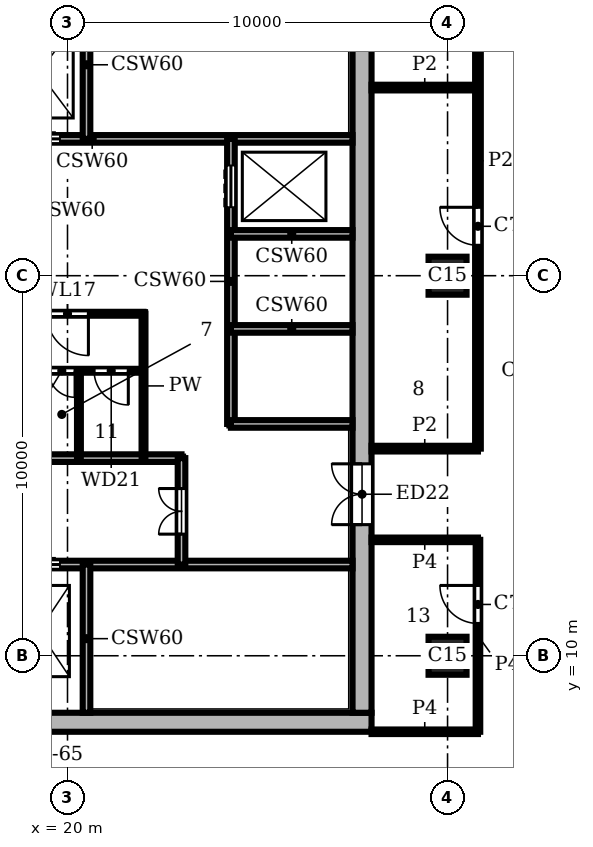
"""IFC4 building model, lengths in metres.
Left out: names, types, materials, properties, quantities, classifications, styles, units other than length and angle.
Written with IfcOpenShell. Run it as: python <this file> out.ifc"""

import sys

from ifc_helpers import new_model, si_unit, direction, frame, frame_2d, origin, origin_2d, place, context, subcontext, project, spatial, rectangle, extrude, element, fill, save


model = new_model("IFC4")
c1 = context("Model", 3, precision=1e-05, world=origin(), true_north=direction((0.0, 1.0)))
c2 = subcontext(c1, "Body", "Model", "MODEL_VIEW")
j1 = project(units=[si_unit("LENGTHUNIT", "METRE"), si_unit("PLANEANGLEUNIT", "RADIAN")], contexts=[c1])
p1 = place(None, origin())
s1 = spatial("IfcSite", under=j1, at=p1, CompositionType="ELEMENT")
p2 = place(p1, origin())
s2 = spatial("IfcBuilding", under=s1, at=p2, CompositionType="ELEMENT")
p3 = place(p2, frame((0.0, 0.0, 306.0)))
s3 = spatial("IfcBuildingStorey", under=s2, at=p3, CompositionType="ELEMENT", Elevation=306.0)
for number, where, z_axis, x_axis in (
    (1, (30.0, 10.0, 0.0), (0.0, 0.0, 1.0), (1.0, 0.0, 0.0)),
    (2, (30.0, 20.0, 0.0), (0.0, 0.0, 1.0), (1.0, 0.0, 0.0)),
):
    element("IfcColumn", number, at=place(p3, frame(where, z_axis=z_axis, x_axis=x_axis)), inside=s3, PredefinedType="COLUMN", context=c2, shape_type="SweptSolid", body=[
        extrude(rectangle(XDim=1.0, YDim=1.0, at=origin_2d()), origin(), (0.0, 0.0, 1.0), 3.9),
    ])
p4 = place(p3, frame((8.0, 8.25, 0.0), z_axis=(0.0, 0.0, 1.0), x_axis=(1.0, 0.0, 0.0)))
e3 = element("IfcWall", 3, at=p4, inside=s3, PredefinedType="SHEAR", context=c2, shape_type="SweptSolid", body=[
    extrude(rectangle(XDim=20.0, YDim=0.5, at=frame_2d((10.0, 0.0))), origin(), (0.0, 0.0, 1.0), 3.9),
])
p5 = place(p3, frame((27.75, 8.5, 0.0), z_axis=(0.0, 0.0, 1.0), x_axis=(0.0, 1.0, 0.0)))
e4 = element("IfcWall", 4, at=p5, inside=s3, PredefinedType="SHEAR", context=c2, shape_type="SweptSolid", body=[
    extrude(rectangle(XDim=19.0, YDim=0.5, at=frame_2d((9.5, 0.0))), origin(), (0.0, 0.0, 1.0), 3.9),
])
p6 = place(p5, frame((4.95, 0.0, 0.0)))
e5 = element("IfcOpeningElement", 5, at=p6, cuts=e4, PredefinedType="OPENING", context=c2, shape_type="SweptSolid", body=[
    extrude(rectangle(XDim=1.6, YDim=2.1, at=frame_2d((0.8, 1.05))), frame((0.0, 0.26, 0.0), z_axis=(0.0, -1.0, 0.0), x_axis=(1.0, 0.0, 0.0)), (0.0, 0.0, 1.0), 0.52),
])
p7 = place(p3, frame((13.8, 12.4, 0.0), z_axis=(0.0, 0.0, 1.0), x_axis=(1.0, 0.0, 0.0)))
e6 = element("IfcWall", 6, at=p7, inside=s3, PredefinedType="SHEAR", context=c2, shape_type="SweptSolid", body=[
    extrude(rectangle(XDim=13.7, YDim=0.2, at=frame_2d((6.85, 0.0))), origin(), (0.0, 0.0, 1.0), 3.58),
])
p8 = place(p7, frame((2.4, 0.0, 0.0)))
e7 = element("IfcOpeningElement", 7, at=p8, cuts=e6, PredefinedType="OPENING", context=c2, shape_type="SweptSolid", body=[
    extrude(rectangle(XDim=1.1, YDim=2.1, at=frame_2d((0.55, 1.05))), frame((0.0, 0.11, 0.0), z_axis=(0.0, -1.0, 0.0), x_axis=(1.0, 0.0, 0.0)), (0.0, 0.0, 1.0), 0.22),
])
p9 = place(p7, frame((4.9, 0.0, 0.0)))
e8 = element("IfcOpeningElement", 8, at=p9, cuts=e6, PredefinedType="OPENING", context=c2, shape_type="SweptSolid", body=[
    extrude(rectangle(XDim=1.1, YDim=2.1, at=frame_2d((0.55, 1.05))), frame((0.0, 0.11, 0.0), z_axis=(0.0, -1.0, 0.0), x_axis=(1.0, 0.0, 0.0)), (0.0, 0.0, 1.0), 0.22),
])
p10 = place(p7, frame((0.15, 0.0, 0.0)))
e9 = element("IfcOpeningElement", 9, at=p10, cuts=e6, PredefinedType="OPENING", context=c2, shape_type="SweptSolid", body=[
    extrude(rectangle(XDim=1.0, YDim=2.1, at=frame_2d((0.5, 1.05))), frame((0.0, 0.11, 0.0), z_axis=(0.0, -1.0, 0.0), x_axis=(1.0, 0.0, 0.0)), (0.0, 0.0, 1.0), 0.22),
])
p11 = place(p3, frame((13.3, 15.2, 0.0), z_axis=(0.0, 0.0, 1.0), x_axis=(1.0, 0.0, 0.0)))
e10 = element("IfcWall", 10, at=p11, inside=s3, PredefinedType="SHEAR", context=c2, shape_type="SweptSolid", body=[
    extrude(rectangle(XDim=9.7, YDim=0.2, at=frame_2d((4.85, 0.0))), origin(), (0.0, 0.0, 1.0), 3.58),
])
p12 = place(p3, frame((24.3, 16.1, 0.0), z_axis=(0.0, 0.0, 1.0), x_axis=(1.0, 0.0, 0.0)))
e11 = element("IfcWall", 11, at=p12, inside=s3, PredefinedType="SHEAR", context=c2, shape_type="SweptSolid", body=[
    extrude(rectangle(XDim=3.2, YDim=0.2, at=frame_2d((1.6, 0.0))), origin(), (0.0, 0.0, 1.0), 3.58),
])
p13 = place(p3, frame((14.0, 17.5, 0.0), z_axis=(0.0, 0.0, 1.0), x_axis=(1.0, 0.0, 0.0)))
e12 = element("IfcWall", 12, at=p13, inside=s3, PredefinedType="PARTITIONING", context=c2, shape_type="SweptSolid", body=[
    extrude(rectangle(XDim=8.0, YDim=0.1, at=frame_2d((4.0, 0.0))), origin(), (0.0, 0.0, 1.0), 3.58),
])
p14 = place(p13, frame((0.9, 0.0, 0.0)))
e13 = element("IfcOpeningElement", 13, at=p14, cuts=e12, PredefinedType="OPENING", context=c2, shape_type="SweptSolid", body=[
    extrude(rectangle(XDim=0.9, YDim=2.1, at=frame_2d((0.45, 1.05))), frame((0.0, 0.06, 0.0), z_axis=(0.0, -1.0, 0.0), x_axis=(1.0, 0.0, 0.0)), (0.0, 0.0, 1.0), 0.12),
])
p15 = place(p13, frame((3.6, 0.0, 0.0)))
e14 = element("IfcOpeningElement", 14, at=p15, cuts=e12, PredefinedType="OPENING", context=c2, shape_type="SweptSolid", body=[
    extrude(rectangle(XDim=0.9, YDim=2.1, at=frame_2d((0.45, 1.05))), frame((0.0, 0.06, 0.0), z_axis=(0.0, -1.0, 0.0), x_axis=(1.0, 0.0, 0.0)), (0.0, 0.0, 1.0), 0.12),
])
p16 = place(p13, frame((5.5, 0.0, 0.0)))
e15 = element("IfcOpeningElement", 15, at=p16, cuts=e12, PredefinedType="OPENING", context=c2, shape_type="SweptSolid", body=[
    extrude(rectangle(XDim=0.7, YDim=2.1, at=frame_2d((0.35, 1.05))), frame((0.0, 0.06, 0.0), z_axis=(0.0, -1.0, 0.0), x_axis=(1.0, 0.0, 0.0)), (0.0, 0.0, 1.0), 0.12),
])
p17 = place(p13, frame((6.7, 0.0, 0.0)))
e16 = element("IfcOpeningElement", 16, at=p17, cuts=e12, PredefinedType="OPENING", context=c2, shape_type="SweptSolid", body=[
    extrude(rectangle(XDim=0.9, YDim=2.1, at=frame_2d((0.45, 1.05))), frame((0.0, 0.06, 0.0), z_axis=(0.0, -1.0, 0.0), x_axis=(1.0, 0.0, 0.0)), (0.0, 0.0, 1.0), 0.12),
])
p18 = place(p3, frame((24.3, 18.6, 0.0), z_axis=(0.0, 0.0, 1.0), x_axis=(1.0, 0.0, 0.0)))
e17 = element("IfcWall", 17, at=p18, inside=s3, PredefinedType="SHEAR", context=c2, shape_type="SweptSolid", body=[
    extrude(rectangle(XDim=3.2, YDim=0.2, at=frame_2d((1.6, 0.0))), origin(), (0.0, 0.0, 1.0), 3.58),
])
p19 = place(p3, frame((14.0, 19.0, 0.0), z_axis=(0.0, 0.0, 1.0), x_axis=(1.0, 0.0, 0.0)))
e18 = element("IfcWall", 18, at=p19, inside=s3, PredefinedType="PARTITIONING", context=c2, shape_type="SweptSolid", body=[
    extrude(rectangle(XDim=8.0, YDim=0.1, at=frame_2d((4.0, 0.0))), origin(), (0.0, 0.0, 1.0), 3.58),
])
p20 = place(p19, frame((5.45, 0.0, 0.0)))
e19 = element("IfcOpeningElement", 19, at=p20, cuts=e18, PredefinedType="OPENING", context=c2, shape_type="SweptSolid", body=[
    extrude(rectangle(XDim=1.1, YDim=2.1, at=frame_2d((0.55, 1.05))), frame((0.0, 0.06, 0.0), z_axis=(0.0, -1.0, 0.0), x_axis=(1.0, 0.0, 0.0)), (0.0, 0.0, 1.0), 0.12),
])
p21 = place(p3, frame((24.3, 21.1, 0.0), z_axis=(0.0, 0.0, 1.0), x_axis=(1.0, 0.0, 0.0)))
e20 = element("IfcWall", 20, at=p21, inside=s3, PredefinedType="SHEAR", context=c2, shape_type="SweptSolid", body=[
    extrude(rectangle(XDim=3.2, YDim=0.2, at=frame_2d((1.6, 0.0))), origin(), (0.0, 0.0, 1.0), 3.58),
])
p22 = place(p3, frame((13.8, 23.6, 0.0), z_axis=(0.0, 0.0, 1.0), x_axis=(1.0, 0.0, 0.0)))
e21 = element("IfcWall", 21, at=p22, inside=s3, PredefinedType="SHEAR", context=c2, shape_type="SweptSolid", body=[
    extrude(rectangle(XDim=13.7, YDim=0.2, at=frame_2d((6.85, 0.0))), origin(), (0.0, 0.0, 1.0), 3.58),
])
p23 = place(p22, frame((2.4, 0.0, 0.0)))
e22 = element("IfcOpeningElement", 22, at=p23, cuts=e21, PredefinedType="OPENING", context=c2, shape_type="SweptSolid", body=[
    extrude(rectangle(XDim=1.1, YDim=2.1, at=frame_2d((0.55, 1.05))), frame((0.0, 0.11, 0.0), z_axis=(0.0, -1.0, 0.0), x_axis=(1.0, 0.0, 0.0)), (0.0, 0.0, 1.0), 0.22),
])
p24 = place(p22, frame((4.9, 0.0, 0.0)))
e23 = element("IfcOpeningElement", 23, at=p24, cuts=e21, PredefinedType="OPENING", context=c2, shape_type="SweptSolid", body=[
    extrude(rectangle(XDim=1.1, YDim=2.1, at=frame_2d((0.55, 1.05))), frame((0.0, 0.11, 0.0), z_axis=(0.0, -1.0, 0.0), x_axis=(1.0, 0.0, 0.0)), (0.0, 0.0, 1.0), 0.22),
])
p25 = place(p22, frame((0.15, 0.0, 0.0)))
e24 = element("IfcOpeningElement", 24, at=p25, cuts=e21, PredefinedType="OPENING", context=c2, shape_type="SweptSolid", body=[
    extrude(rectangle(XDim=1.0, YDim=2.1, at=frame_2d((0.5, 1.05))), frame((0.0, 0.11, 0.0), z_axis=(0.0, -1.0, 0.0), x_axis=(1.0, 0.0, 0.0)), (0.0, 0.0, 1.0), 0.22),
])
p26 = place(p3, frame((20.3, 15.2, 0.0), z_axis=(0.0, 0.0, 1.0), x_axis=(0.0, 1.0, 0.0)))
e25 = element("IfcWall", 25, at=p26, inside=s3, PredefinedType="PARTITIONING", context=c2, shape_type="SweptSolid", body=[
    extrude(rectangle(XDim=2.3, YDim=0.1, at=frame_2d((1.15, 0.0))), origin(), (0.0, 0.0, 1.0), 3.58),
])
for number, where, z_axis, x_axis in (
    (26, (20.5, 8.5, 0.0), (0.0, 0.0, 1.0), (0.0, 1.0, 0.0)),
    (27, (20.5, 23.6, 0.0), (0.0, 0.0, 1.0), (0.0, 1.0, 0.0)),
):
    element("IfcWall", number, at=place(p3, frame(where, z_axis=z_axis, x_axis=x_axis)), inside=s3, PredefinedType="SHEAR", context=c2, shape_type="SweptSolid", body=[
        extrude(rectangle(XDim=3.9, YDim=0.2, at=frame_2d((1.95, 0.0))), origin(), (0.0, 0.0, 1.0), 3.58),
    ])
p27 = place(p3, frame((22.0, 15.2, 0.0), z_axis=(0.0, 0.0, 1.0), x_axis=(0.0, 1.0, 0.0)))
e28 = element("IfcWall", 28, at=p27, inside=s3, PredefinedType="PARTITIONING", context=c2, shape_type="SweptSolid", body=[
    extrude(rectangle(XDim=3.8, YDim=0.1, at=frame_2d((1.9, 0.0))), origin(), (0.0, 0.0, 1.0), 3.58),
])
p28 = place(p3, frame((23.0, 12.4, 0.0), z_axis=(0.0, 0.0, 1.0), x_axis=(0.0, 1.0, 0.0)))
e29 = element("IfcWall", 29, at=p28, inside=s3, PredefinedType="SHEAR", context=c2, shape_type="SweptSolid", body=[
    extrude(rectangle(XDim=2.8, YDim=0.2, at=frame_2d((1.4, 0.0))), origin(), (0.0, 0.0, 1.0), 3.58),
])
p29 = place(p28, frame((0.8, 0.0, 0.0)))
e30 = element("IfcOpeningElement", 30, at=p29, cuts=e29, PredefinedType="OPENING", context=c2, shape_type="SweptSolid", body=[
    extrude(rectangle(XDim=1.2, YDim=2.1, at=frame_2d((0.6, 1.05))), frame((0.0, 0.11, 0.0), z_axis=(0.0, -1.0, 0.0), x_axis=(1.0, 0.0, 0.0)), (0.0, 0.0, 1.0), 0.22),
])
p30 = place(p3, frame((24.3, 16.1, 0.0), z_axis=(0.0, 0.0, 1.0), x_axis=(0.0, 1.0, 0.0)))
e31 = element("IfcWall", 31, at=p30, inside=s3, PredefinedType="SHEAR", context=c2, shape_type="SweptSolid", body=[
    extrude(rectangle(XDim=7.5, YDim=0.2, at=frame_2d((3.75, 0.0))), origin(), (0.0, 0.0, 1.0), 3.58),
])
p31 = place(p30, frame((5.7, 0.0, 0.0)))
e32 = element("IfcOpeningElement", 32, at=p31, cuts=e31, PredefinedType="OPENING", context=c2, shape_type="SweptSolid", body=[
    extrude(rectangle(XDim=1.1, YDim=2.1, at=frame_2d((0.55, 1.05))), frame((0.0, 0.11, 0.0), z_axis=(0.0, -1.0, 0.0), x_axis=(1.0, 0.0, 0.0)), (0.0, 0.0, 1.0), 0.22),
])
p32 = place(p3, frame((30.8, 15.45, 0.0), z_axis=(0.0, 0.0, 1.0), x_axis=(0.0, 1.0, 0.0)))
e33 = element("IfcWall", 33, at=p32, inside=s3, PredefinedType="PARTITIONING", context=c2, shape_type="SweptSolid", body=[
    extrude(rectangle(XDim=15.15, YDim=0.15, at=frame_2d((7.575, 0.0))), origin(), (0.0, 0.0, 1.0), 3.58),
])
p33 = place(p32, frame((5.35, 0.0, 0.0)))
e34 = element("IfcOpeningElement", 34, at=p33, cuts=e33, PredefinedType="OPENING", context=c2, shape_type="SweptSolid", body=[
    extrude(rectangle(XDim=1.0, YDim=2.1, at=frame_2d((0.5, 1.05))), frame((0.0, 0.085, 0.0), z_axis=(0.0, -1.0, 0.0), x_axis=(1.0, 0.0, 0.0)), (0.0, 0.0, 1.0), 0.17),
])
for number, where, z_axis, x_axis in (
    (35, (28.0, 15.45, 0.0), (0.0, 0.0, 1.0), (1.0, 0.0, 0.0)),
    (36, (28.0, 24.95, 0.0), (0.0, 0.0, 1.0), (1.0, 0.0, 0.0)),
):
    element("IfcWall", number, at=place(p3, frame(where, z_axis=z_axis, x_axis=x_axis)), inside=s3, PredefinedType="PARTITIONING", context=c2, shape_type="SweptSolid", body=[
        extrude(rectangle(XDim=2.8, YDim=0.15, at=frame_2d((1.4, 0.0))), origin(), (0.0, 0.0, 1.0), 3.58),
    ])
p34 = place(p3, frame((30.8, 8.0, 0.0), z_axis=(0.0, 0.0, 1.0), x_axis=(0.0, 1.0, 0.0)))
e37 = element("IfcWall", 37, at=p34, inside=s3, PredefinedType="PARTITIONING", context=c2, shape_type="SweptSolid", body=[
    extrude(rectangle(XDim=5.05, YDim=0.12, at=frame_2d((2.525, 0.0))), origin(), (0.0, 0.0, 1.0), 3.58),
])
p35 = place(p34, frame((2.85, 0.0, 0.0)))
e38 = element("IfcOpeningElement", 38, at=p35, cuts=e37, PredefinedType="OPENING", context=c2, shape_type="SweptSolid", body=[
    extrude(rectangle(XDim=1.0, YDim=2.1, at=frame_2d((0.5, 1.05))), frame((0.0, 0.07, 0.0), z_axis=(0.0, -1.0, 0.0), x_axis=(1.0, 0.0, 0.0)), (0.0, 0.0, 1.0), 0.14),
])
for number, where, z_axis, x_axis in (
    (39, (28.0, 8.0, 0.0), (0.0, 0.0, 1.0), (1.0, 0.0, 0.0)),
    (40, (28.0, 13.05, 0.0), (0.0, 0.0, 1.0), (1.0, 0.0, 0.0)),
):
    element("IfcWall", number, at=place(p3, frame(where, z_axis=z_axis, x_axis=x_axis)), inside=s3, PredefinedType="PARTITIONING", context=c2, shape_type="SweptSolid", body=[
        extrude(rectangle(XDim=2.8, YDim=0.12, at=frame_2d((1.4, 0.0))), origin(), (0.0, 0.0, 1.0), 3.58),
    ])
p36 = place(p31, origin())
e41 = element("IfcDoor", 41, at=p36, inside=s3, OperationType="DOUBLE_DOOR_SLIDING", PredefinedType="DOOR", context=c2, shape_type="SweptSolid", body=[
    extrude(rectangle(XDim=1.1, YDim=2.1, at=frame_2d((0.55, 1.05))), frame((0.0, 0.025, 0.0), z_axis=(0.0, -1.0, 0.0), x_axis=(1.0, 0.0, 0.0)), (0.0, 0.0, 1.0), 0.05),
])
fill(e32, e41)
p37 = place(p9, origin())
e42 = element("IfcDoor", 42, at=p37, inside=s3, OperationType="DOUBLE_DOOR_SLIDING", PredefinedType="DOOR", context=c2, shape_type="SweptSolid", body=[
    extrude(rectangle(XDim=1.1, YDim=2.1, at=frame_2d((0.55, 1.05))), frame((0.0, 0.025, 0.0), z_axis=(0.0, -1.0, 0.0), x_axis=(1.0, 0.0, 0.0)), (0.0, 0.0, 1.0), 0.05),
])
fill(e8, e42)
p38 = place(p24, origin())
e43 = element("IfcDoor", 43, at=p38, inside=s3, OperationType="DOUBLE_DOOR_SLIDING", PredefinedType="DOOR", context=c2, shape_type="SweptSolid", body=[
    extrude(rectangle(XDim=1.1, YDim=2.1, at=frame_2d((0.55, 1.05))), frame((0.0, 0.025, 0.0), z_axis=(0.0, -1.0, 0.0), x_axis=(1.0, 0.0, 0.0)), (0.0, 0.0, 1.0), 0.05),
])
fill(e23, e43)
p39 = place(p29, origin())
e44 = element("IfcDoor", 44, at=p39, inside=s3, OperationType="DOUBLE_DOOR_SINGLE_SWING", PredefinedType="DOOR", context=c2, shape_type="SweptSolid", body=[
    extrude(rectangle(XDim=1.2, YDim=2.1, at=frame_2d((0.6, 1.05))), frame((0.0, 0.025, 0.0), z_axis=(0.0, -1.0, 0.0), x_axis=(1.0, 0.0, 0.0)), (0.0, 0.0, 1.0), 0.05),
])
fill(e30, e44)
p40 = place(p20, frame((1.1, 0.0, 0.0), z_axis=(0.0, 0.0, 1.0), x_axis=(-1.0, 0.0, 0.0)))
e45 = element("IfcDoor", 45, at=p40, inside=s3, OperationType="SINGLE_SWING_LEFT", PredefinedType="DOOR", context=c2, shape_type="SweptSolid", body=[
    extrude(rectangle(XDim=1.1, YDim=2.1, at=frame_2d((0.55, 1.05))), frame((0.0, 0.025, 0.0), z_axis=(0.0, -1.0, 0.0), x_axis=(1.0, 0.0, 0.0)), (0.0, 0.0, 1.0), 0.05),
])
fill(e19, e45)
p41 = place(p16, frame((0.7, 0.0, 0.0), z_axis=(0.0, 0.0, 1.0), x_axis=(-1.0, 0.0, 0.0)))
e46 = element("IfcDoor", 46, at=p41, inside=s3, OperationType="SINGLE_SWING_LEFT", PredefinedType="DOOR", context=c2, shape_type="SweptSolid", body=[
    extrude(rectangle(XDim=0.7, YDim=2.1, at=frame_2d((0.35, 1.05))), frame((0.0, 0.025, 0.0), z_axis=(0.0, -1.0, 0.0), x_axis=(1.0, 0.0, 0.0)), (0.0, 0.0, 1.0), 0.05),
])
fill(e15, e46)
p42 = place(p17, frame((0.9, 0.0, 0.0), z_axis=(0.0, 0.0, 1.0), x_axis=(-1.0, 0.0, 0.0)))
e47 = element("IfcDoor", 47, at=p42, inside=s3, OperationType="SINGLE_SWING_LEFT", PredefinedType="DOOR", context=c2, shape_type="SweptSolid", body=[
    extrude(rectangle(XDim=0.9, YDim=2.1, at=frame_2d((0.45, 1.05))), frame((0.0, 0.025, 0.0), z_axis=(0.0, -1.0, 0.0), x_axis=(1.0, 0.0, 0.0)), (0.0, 0.0, 1.0), 0.05),
])
fill(e16, e47)
p43 = place(p6, origin())
e48 = element("IfcDoor", 48, at=p43, inside=s3, OperationType="DOUBLE_DOOR_SINGLE_SWING", PredefinedType="DOOR", context=c2, shape_type="SweptSolid", body=[
    extrude(rectangle(XDim=1.6, YDim=2.1, at=frame_2d((0.8, 1.05))), frame((0.0, 0.025, 0.0), z_axis=(0.0, -1.0, 0.0), x_axis=(1.0, 0.0, 0.0)), (0.0, 0.0, 1.0), 0.05),
])
fill(e5, e48)
p44 = place(p33, origin())
e49 = element("IfcDoor", 49, at=p44, inside=s3, OperationType="SINGLE_SWING_RIGHT", PredefinedType="DOOR", context=c2, shape_type="SweptSolid", body=[
    extrude(rectangle(XDim=1.0, YDim=2.1, at=frame_2d((0.5, 1.05))), frame((0.0, 0.025, 0.0), z_axis=(0.0, -1.0, 0.0), x_axis=(1.0, 0.0, 0.0)), (0.0, 0.0, 1.0), 0.05),
])
fill(e34, e49)
p45 = place(p35, origin())
e50 = element("IfcDoor", 50, at=p45, inside=s3, OperationType="SINGLE_SWING_RIGHT", PredefinedType="DOOR", context=c2, shape_type="SweptSolid", body=[
    extrude(rectangle(XDim=1.0, YDim=2.1, at=frame_2d((0.5, 1.05))), frame((0.0, 0.025, 0.0), z_axis=(0.0, -1.0, 0.0), x_axis=(1.0, 0.0, 0.0)), (0.0, 0.0, 1.0), 0.05),
])
fill(e38, e50)
save(model, sys.argv[1])
